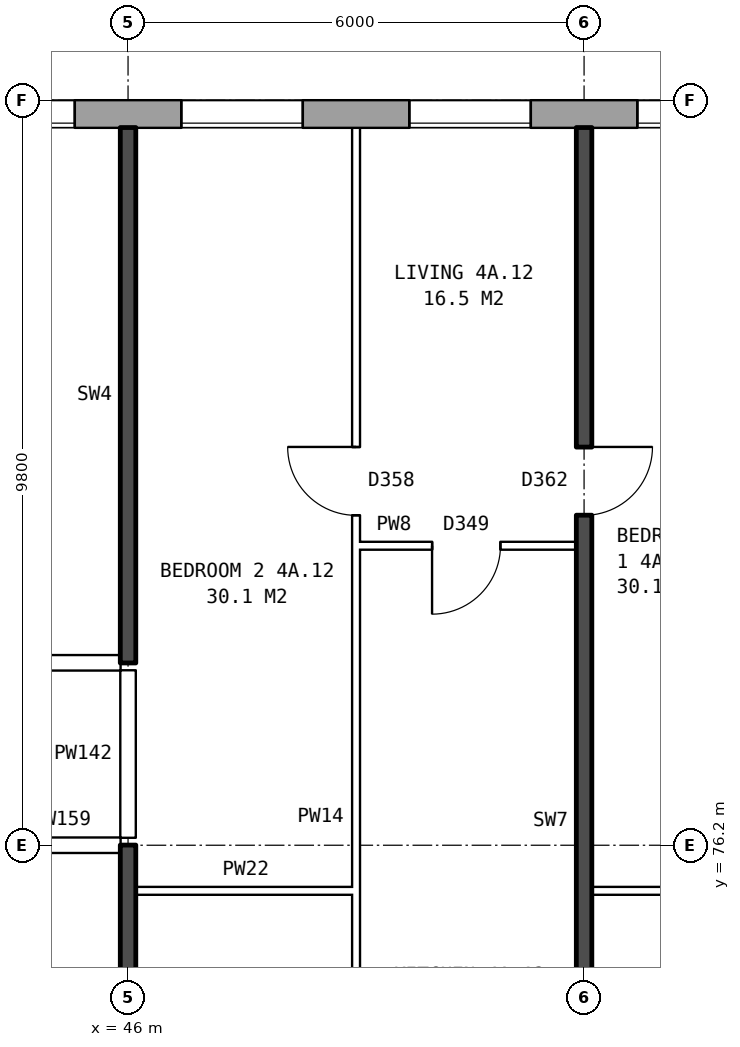
"""IFC4 building model, lengths in metres.
Left out: names, types, materials, properties, quantities, classifications, styles, units other than length and angle.
Written with IfcOpenShell. Run it as: python <this file> out.ifc"""

import sys

from ifc_helpers import new_model, si_unit, direction, frame, frame_2d, origin, place, context, subcontext, project, spatial, rectangle, extrude, element, fill, save


model = new_model("IFC4")
c1 = context("Model", 3, precision=1e-05, world=origin(), true_north=direction((0.0, 1.0)))
c2 = subcontext(c1, "Body", "Model", "MODEL_VIEW")
j1 = project(units=[si_unit("LENGTHUNIT", "METRE"), si_unit("PLANEANGLEUNIT", "RADIAN")], contexts=[c1])
p1 = place(None, origin())
s1 = spatial("IfcSite", under=j1, at=p1, CompositionType="ELEMENT")
p2 = place(p1, origin())
s2 = spatial("IfcBuilding", under=s1, at=p2, CompositionType="ELEMENT")
p3 = place(p2, frame((0.0, 0.0, 19.5)))
s3 = spatial("IfcBuildingStorey", under=s2, at=p3, CompositionType="ELEMENT", Elevation=19.5)
p4 = place(p3, frame((72.925, 85.82, 0.0), z_axis=(0.0, 0.0, 1.0), x_axis=(-1.0, 0.0, 0.0)))
e1 = element("IfcWall", 1, at=p4, inside=s3, PredefinedType="STANDARD", context=c2, shape_type="SweptSolid", body=[
    extrude(rectangle(XDim=50.101, YDim=0.36, at=frame_2d((25.05, 0.0))), origin(), (0.0, 0.0, 1.0), 2.85),
])
p5 = place(p4, frame((0.75, 0.0, 0.8)))
e2 = element("IfcOpeningElement", 2, at=p5, cuts=e1, PredefinedType="OPENING", context=c2, shape_type="SweptSolid", body=[
    extrude(rectangle(XDim=0.6, YDim=0.9, at=frame_2d((0.3, 0.45))), frame((0.0, 0.19, 0.0), z_axis=(0.0, -1.0, 0.0), x_axis=(1.0, 0.0, 0.0)), (0.0, 0.0, 1.0), 0.38),
])
p6 = place(p4, frame((3.625, 0.0, 0.8)))
e3 = element("IfcOpeningElement", 3, at=p6, cuts=e1, PredefinedType="OPENING", context=c2, shape_type="SweptSolid", body=[
    extrude(rectangle(XDim=1.6, YDim=1.8, at=frame_2d((0.8, 0.9))), frame((0.0, 0.19, 0.0), z_axis=(0.0, -1.0, 0.0), x_axis=(1.0, 0.0, 0.0)), (0.0, 0.0, 1.0), 0.38),
])
p7 = place(p4, frame((6.625, 0.0, 0.8)))
e4 = element("IfcOpeningElement", 4, at=p7, cuts=e1, PredefinedType="OPENING", context=c2, shape_type="SweptSolid", body=[
    extrude(rectangle(XDim=1.6, YDim=1.8, at=frame_2d((0.8, 0.9))), frame((0.0, 0.19, 0.0), z_axis=(0.0, -1.0, 0.0), x_axis=(1.0, 0.0, 0.0)), (0.0, 0.0, 1.0), 0.38),
])
p8 = place(p4, frame((9.625, 0.0, 0.8)))
e5 = element("IfcOpeningElement", 5, at=p8, cuts=e1, PredefinedType="OPENING", context=c2, shape_type="SweptSolid", body=[
    extrude(rectangle(XDim=1.6, YDim=1.8, at=frame_2d((0.8, 0.9))), frame((0.0, 0.19, 0.0), z_axis=(0.0, -1.0, 0.0), x_axis=(1.0, 0.0, 0.0)), (0.0, 0.0, 1.0), 0.38),
])
p9 = place(p4, frame((12.625, 0.0, 0.8)))
e6 = element("IfcOpeningElement", 6, at=p9, cuts=e1, PredefinedType="OPENING", context=c2, shape_type="SweptSolid", body=[
    extrude(rectangle(XDim=1.6, YDim=1.8, at=frame_2d((0.8, 0.9))), frame((0.0, 0.19, 0.0), z_axis=(0.0, -1.0, 0.0), x_axis=(1.0, 0.0, 0.0)), (0.0, 0.0, 1.0), 0.38),
])
p10 = place(p4, frame((15.625, 0.0, 0.8)))
e7 = element("IfcOpeningElement", 7, at=p10, cuts=e1, PredefinedType="OPENING", context=c2, shape_type="SweptSolid", body=[
    extrude(rectangle(XDim=1.6, YDim=1.8, at=frame_2d((0.8, 0.9))), frame((0.0, 0.19, 0.0), z_axis=(0.0, -1.0, 0.0), x_axis=(1.0, 0.0, 0.0)), (0.0, 0.0, 1.0), 0.38),
])
p11 = place(p4, frame((18.625, 0.0, 0.8)))
e8 = element("IfcOpeningElement", 8, at=p11, cuts=e1, PredefinedType="OPENING", context=c2, shape_type="SweptSolid", body=[
    extrude(rectangle(XDim=1.6, YDim=1.8, at=frame_2d((0.8, 0.9))), frame((0.0, 0.19, 0.0), z_axis=(0.0, -1.0, 0.0), x_axis=(1.0, 0.0, 0.0)), (0.0, 0.0, 1.0), 0.38),
])
p12 = place(p4, frame((21.625, 0.0, 0.8)))
e9 = element("IfcOpeningElement", 9, at=p12, cuts=e1, PredefinedType="OPENING", context=c2, shape_type="SweptSolid", body=[
    extrude(rectangle(XDim=1.6, YDim=1.8, at=frame_2d((0.8, 0.9))), frame((0.0, 0.19, 0.0), z_axis=(0.0, -1.0, 0.0), x_axis=(1.0, 0.0, 0.0)), (0.0, 0.0, 1.0), 0.38),
])
p13 = place(p4, frame((24.625, 0.0, 0.8)))
e10 = element("IfcOpeningElement", 10, at=p13, cuts=e1, PredefinedType="OPENING", context=c2, shape_type="SweptSolid", body=[
    extrude(rectangle(XDim=1.6, YDim=1.8, at=frame_2d((0.8, 0.9))), frame((0.0, 0.19, 0.0), z_axis=(0.0, -1.0, 0.0), x_axis=(1.0, 0.0, 0.0)), (0.0, 0.0, 1.0), 0.38),
])
p14 = place(p4, frame((27.625, 0.0, 0.8)))
e11 = element("IfcOpeningElement", 11, at=p14, cuts=e1, PredefinedType="OPENING", context=c2, shape_type="SweptSolid", body=[
    extrude(rectangle(XDim=1.6, YDim=1.8, at=frame_2d((0.8, 0.9))), frame((0.0, 0.19, 0.0), z_axis=(0.0, -1.0, 0.0), x_axis=(1.0, 0.0, 0.0)), (0.0, 0.0, 1.0), 0.38),
])
p15 = place(p4, frame((30.625, 0.0, 0.8)))
e12 = element("IfcOpeningElement", 12, at=p15, cuts=e1, PredefinedType="OPENING", context=c2, shape_type="SweptSolid", body=[
    extrude(rectangle(XDim=1.6, YDim=1.8, at=frame_2d((0.8, 0.9))), frame((0.0, 0.19, 0.0), z_axis=(0.0, -1.0, 0.0), x_axis=(1.0, 0.0, 0.0)), (0.0, 0.0, 1.0), 0.38),
])
p16 = place(p4, frame((33.625, 0.0, 0.8)))
e13 = element("IfcOpeningElement", 13, at=p16, cuts=e1, PredefinedType="OPENING", context=c2, shape_type="SweptSolid", body=[
    extrude(rectangle(XDim=1.6, YDim=1.8, at=frame_2d((0.8, 0.9))), frame((0.0, 0.19, 0.0), z_axis=(0.0, -1.0, 0.0), x_axis=(1.0, 0.0, 0.0)), (0.0, 0.0, 1.0), 0.38),
])
p17 = place(p4, frame((36.625, 0.0, 0.8)))
e14 = element("IfcOpeningElement", 14, at=p17, cuts=e1, PredefinedType="OPENING", context=c2, shape_type="SweptSolid", body=[
    extrude(rectangle(XDim=1.6, YDim=1.8, at=frame_2d((0.8, 0.9))), frame((0.0, 0.19, 0.0), z_axis=(0.0, -1.0, 0.0), x_axis=(1.0, 0.0, 0.0)), (0.0, 0.0, 1.0), 0.38),
])
p18 = place(p4, frame((39.625, 0.0, 0.8)))
e15 = element("IfcOpeningElement", 15, at=p18, cuts=e1, PredefinedType="OPENING", context=c2, shape_type="SweptSolid", body=[
    extrude(rectangle(XDim=1.6, YDim=1.8, at=frame_2d((0.8, 0.9))), frame((0.0, 0.19, 0.0), z_axis=(0.0, -1.0, 0.0), x_axis=(1.0, 0.0, 0.0)), (0.0, 0.0, 1.0), 0.38),
])
p19 = place(p4, frame((42.625, 0.0, 0.8)))
e16 = element("IfcOpeningElement", 16, at=p19, cuts=e1, PredefinedType="OPENING", context=c2, shape_type="SweptSolid", body=[
    extrude(rectangle(XDim=1.6, YDim=1.8, at=frame_2d((0.8, 0.9))), frame((0.0, 0.19, 0.0), z_axis=(0.0, -1.0, 0.0), x_axis=(1.0, 0.0, 0.0)), (0.0, 0.0, 1.0), 0.38),
])
p20 = place(p4, frame((45.625, 0.0, 0.8)))
e17 = element("IfcOpeningElement", 17, at=p20, cuts=e1, PredefinedType="OPENING", context=c2, shape_type="SweptSolid", body=[
    extrude(rectangle(XDim=1.6, YDim=1.8, at=frame_2d((0.8, 0.9))), frame((0.0, 0.19, 0.0), z_axis=(0.0, -1.0, 0.0), x_axis=(1.0, 0.0, 0.0)), (0.0, 0.0, 1.0), 0.38),
])
p21 = place(p4, frame((1.65, 0.0, 0.8)))
e18 = element("IfcOpeningElement", 18, at=p21, cuts=e1, PredefinedType="OPENING", context=c2, shape_type="SweptSolid", body=[
    extrude(rectangle(XDim=1.0, YDim=1.5, at=frame_2d((0.5, 0.75))), frame((0.0, 0.19, 0.0), z_axis=(0.0, -1.0, 0.0), x_axis=(1.0, 0.0, 0.0)), (0.0, 0.0, 1.0), 0.38),
])
p22 = place(p3, frame((46.1, 75.6, 0.0), z_axis=(0.0, 0.0, 1.0), x_axis=(1.0, 0.0, 0.0)))
e19 = element("IfcWall", 19, at=p22, inside=s3, PredefinedType="PARTITIONING", context=c2, shape_type="SweptSolid", body=[
    extrude(rectangle(XDim=2.9, YDim=0.1, at=frame_2d((1.45, 0.0))), origin(), (0.0, 0.0, 1.0), 2.85),
])
p23 = place(p3, frame((52.1, 75.6, 0.0), z_axis=(0.0, 0.0, 1.0), x_axis=(1.0, 0.0, 0.0)))
e20 = element("IfcWall", 20, at=p23, inside=s3, PredefinedType="PARTITIONING", context=c2, shape_type="SweptSolid", body=[
    extrude(rectangle(XDim=2.8, YDim=0.1, at=frame_2d((1.4, 0.0))), origin(), (0.0, 0.0, 1.0), 2.85),
])
p24 = place(p3, frame((44.36, 76.2, 0.0), z_axis=(0.0, 0.0, 1.0), x_axis=(1.0, 0.0, 0.0)))
e21 = element("IfcWall", 21, at=p24, inside=s3, PredefinedType="PARTITIONING", context=c2, shape_type="SweptSolid", body=[
    extrude(rectangle(XDim=1.54, YDim=0.2, at=frame_2d((0.77, 0.0))), origin(), (0.0, 0.0, 1.0), 2.85),
])
p25 = place(p3, frame((20.11, 78.6, 0.0), z_axis=(0.0, 0.0, 1.0), x_axis=(1.0, 0.0, 0.0)))
e22 = element("IfcWall", 22, at=p25, inside=s3, PredefinedType="PARTITIONING", context=c2, shape_type="SweptSolid", body=[
    extrude(rectangle(XDim=25.79, YDim=0.2, at=frame_2d((12.895, 0.0))), origin(), (0.0, 0.0, 1.0), 2.85),
])
p26 = place(p25, frame((22.34, 0.0, 0.0)))
e23 = element("IfcOpeningElement", 23, at=p26, cuts=e22, PredefinedType="OPENING", context=c2, shape_type="SweptSolid", body=[
    extrude(rectangle(XDim=1.0, YDim=2.1, at=frame_2d((0.5, 1.05))), frame((0.0, 0.11, 0.0), z_axis=(0.0, -1.0, 0.0), x_axis=(1.0, 0.0, 0.0)), (0.0, 0.0, 1.0), 0.22),
])
p27 = place(p25, frame((10.39, 0.0, 0.0)))
e24 = element("IfcOpeningElement", 24, at=p27, cuts=e22, PredefinedType="OPENING", context=c2, shape_type="SweptSolid", body=[
    extrude(rectangle(XDim=1.0, YDim=2.1, at=frame_2d((0.5, 1.05))), frame((0.0, 0.11, 0.0), z_axis=(0.0, -1.0, 0.0), x_axis=(1.0, 0.0, 0.0)), (0.0, 0.0, 1.0), 0.22),
])
p28 = place(p25, frame((2.245, 0.0, 0.0)))
e25 = element("IfcOpeningElement", 25, at=p28, cuts=e22, PredefinedType="OPENING", context=c2, shape_type="SweptSolid", body=[
    extrude(rectangle(XDim=1.0, YDim=2.1, at=frame_2d((0.5, 1.05))), frame((0.0, 0.11, 0.0), z_axis=(0.0, -1.0, 0.0), x_axis=(1.0, 0.0, 0.0)), (0.0, 0.0, 1.0), 0.22),
])
p29 = place(p3, frame((49.0, 80.14, 0.0), z_axis=(0.0, 0.0, 1.0), x_axis=(1.0, 0.0, 0.0)))
e26 = element("IfcWall", 26, at=p29, inside=s3, PredefinedType="PARTITIONING", context=c2, shape_type="SweptSolid", body=[
    extrude(rectangle(XDim=2.9, YDim=0.1, at=frame_2d((1.45, 0.0))), origin(), (0.0, 0.0, 1.0), 2.85),
])
p30 = place(p29, frame((1.0, 0.0, 0.0)))
e27 = element("IfcOpeningElement", 27, at=p30, cuts=e26, PredefinedType="OPENING", context=c2, shape_type="SweptSolid", body=[
    extrude(rectangle(XDim=0.9, YDim=2.1, at=frame_2d((0.45, 1.05))), frame((0.0, 0.06, 0.0), z_axis=(0.0, -1.0, 0.0), x_axis=(1.0, 0.0, 0.0)), (0.0, 0.0, 1.0), 0.12),
])
p31 = place(p3, frame((46.0, 71.2, 0.0), z_axis=(0.0, 0.0, 1.0), x_axis=(0.0, 1.0, 0.0)))
e28 = element("IfcWall", 28, at=p31, inside=s3, PredefinedType="SOLIDWALL", context=c2, shape_type="SweptSolid", body=[
    extrude(rectangle(XDim=5.0, YDim=0.2, at=frame_2d((2.5, 0.0))), origin(), (0.0, 0.0, 1.0), 2.85),
])
p32 = place(p3, frame((46.0, 76.3, 0.0), z_axis=(0.0, 0.0, 1.0), x_axis=(0.0, 1.0, 0.0)))
e29 = element("IfcWall", 29, at=p32, inside=s3, PredefinedType="PARTITIONING", context=c2, shape_type="SweptSolid", body=[
    extrude(rectangle(XDim=2.2, YDim=0.2, at=frame_2d((1.1, 0.0))), origin(), (0.0, 0.0, 1.0), 2.85),
])
p33 = place(p3, frame((46.0, 78.6, 0.0), z_axis=(0.0, 0.0, 1.0), x_axis=(0.0, 1.0, 0.0)))
e30 = element("IfcWall", 30, at=p33, inside=s3, PredefinedType="SOLIDWALL", context=c2, shape_type="SweptSolid", body=[
    extrude(rectangle(XDim=7.04, YDim=0.2, at=frame_2d((3.52, 0.0))), origin(), (0.0, 0.0, 1.0), 2.85),
])
p34 = place(p3, frame((49.0, 71.3, 0.0), z_axis=(0.0, 0.0, 1.0), x_axis=(0.0, 1.0, 0.0)))
e31 = element("IfcWall", 31, at=p34, inside=s3, PredefinedType="PARTITIONING", context=c2, shape_type="SweptSolid", body=[
    extrude(rectangle(XDim=14.34, YDim=0.1, at=frame_2d((7.17, 0.0))), origin(), (0.0, 0.0, 1.0), 2.85),
])
p35 = place(p34, frame((9.24, 0.0, 0.0)))
e32 = element("IfcOpeningElement", 32, at=p35, cuts=e31, PredefinedType="OPENING", context=c2, shape_type="SweptSolid", body=[
    extrude(rectangle(XDim=0.9, YDim=2.1, at=frame_2d((0.45, 1.05))), frame((0.0, 0.06, 0.0), z_axis=(0.0, -1.0, 0.0), x_axis=(1.0, 0.0, 0.0)), (0.0, 0.0, 1.0), 0.12),
])
p36 = place(p34, frame((0.4, 0.0, 0.0)))
e33 = element("IfcOpeningElement", 33, at=p36, cuts=e31, PredefinedType="OPENING", context=c2, shape_type="SweptSolid", body=[
    extrude(rectangle(XDim=0.9, YDim=2.1, at=frame_2d((0.45, 1.05))), frame((0.0, 0.06, 0.0), z_axis=(0.0, -1.0, 0.0), x_axis=(1.0, 0.0, 0.0)), (0.0, 0.0, 1.0), 0.12),
])
p37 = place(p3, frame((52.0, 71.2, 0.0), z_axis=(0.0, 0.0, 1.0), x_axis=(0.0, 1.0, 0.0)))
e34 = element("IfcWall", 34, at=p37, inside=s3, PredefinedType="SOLIDWALL", context=c2, shape_type="SweptSolid", body=[
    extrude(rectangle(XDim=14.44, YDim=0.2, at=frame_2d((7.22, 0.0))), origin(), (0.0, 0.0, 1.0), 2.85),
])
p38 = place(p37, frame((9.34, 0.0, 0.0)))
e35 = element("IfcOpeningElement", 35, at=p38, cuts=e34, PredefinedType="OPENING", context=c2, shape_type="SweptSolid", body=[
    extrude(rectangle(XDim=0.9, YDim=2.1, at=frame_2d((0.45, 1.05))), frame((0.0, 0.11, 0.0), z_axis=(0.0, -1.0, 0.0), x_axis=(1.0, 0.0, 0.0)), (0.0, 0.0, 1.0), 0.22),
])
p39 = place(p37, frame((0.4, 0.0, 0.0)))
e36 = element("IfcOpeningElement", 36, at=p39, cuts=e34, PredefinedType="OPENING", context=c2, shape_type="SweptSolid", body=[
    extrude(rectangle(XDim=0.9, YDim=2.1, at=frame_2d((0.45, 1.05))), frame((0.0, 0.11, 0.0), z_axis=(0.0, -1.0, 0.0), x_axis=(1.0, 0.0, 0.0)), (0.0, 0.0, 1.0), 0.22),
])
p40 = place(p11, origin())
e37 = element("IfcWindow", 37, at=p40, inside=s3, PartitioningType="SINGLE_PANEL", PredefinedType="WINDOW", context=c2, shape_type="SweptSolid", body=[
    extrude(rectangle(XDim=1.6, YDim=1.8, at=frame_2d((0.8, 0.9))), frame((0.0, 0.15, 0.0), z_axis=(0.0, -1.0, 0.0), x_axis=(1.0, 0.0, 0.0)), (0.0, 0.0, 1.0), 0.06),
])
fill(e8, e37)
p41 = place(p12, origin())
e38 = element("IfcWindow", 38, at=p41, inside=s3, PartitioningType="SINGLE_PANEL", PredefinedType="WINDOW", context=c2, shape_type="SweptSolid", body=[
    extrude(rectangle(XDim=1.6, YDim=1.8, at=frame_2d((0.8, 0.9))), frame((0.0, 0.15, 0.0), z_axis=(0.0, -1.0, 0.0), x_axis=(1.0, 0.0, 0.0)), (0.0, 0.0, 1.0), 0.06),
])
fill(e9, e38)
p42 = place(p13, origin())
e39 = element("IfcWindow", 39, at=p42, inside=s3, PartitioningType="SINGLE_PANEL", PredefinedType="WINDOW", context=c2, shape_type="SweptSolid", body=[
    extrude(rectangle(XDim=1.6, YDim=1.8, at=frame_2d((0.8, 0.9))), frame((0.0, 0.15, 0.0), z_axis=(0.0, -1.0, 0.0), x_axis=(1.0, 0.0, 0.0)), (0.0, 0.0, 1.0), 0.06),
])
fill(e10, e39)
p43 = place(p14, origin())
e40 = element("IfcWindow", 40, at=p43, inside=s3, PartitioningType="SINGLE_PANEL", PredefinedType="WINDOW", context=c2, shape_type="SweptSolid", body=[
    extrude(rectangle(XDim=1.6, YDim=1.8, at=frame_2d((0.8, 0.9))), frame((0.0, 0.15, 0.0), z_axis=(0.0, -1.0, 0.0), x_axis=(1.0, 0.0, 0.0)), (0.0, 0.0, 1.0), 0.06),
])
fill(e11, e40)
p44 = place(p38, frame((0.9, 0.0, 0.0), z_axis=(0.0, 0.0, 1.0), x_axis=(-1.0, 0.0, 0.0)))
e41 = element("IfcDoor", 41, at=p44, inside=s3, OperationType="SINGLE_SWING_LEFT", PredefinedType="DOOR", context=c2, shape_type="SweptSolid", body=[
    extrude(rectangle(XDim=0.9, YDim=2.1, at=frame_2d((0.45, 1.05))), frame((0.0, 0.025, 0.0), z_axis=(0.0, -1.0, 0.0), x_axis=(1.0, 0.0, 0.0)), (0.0, 0.0, 1.0), 0.05),
])
fill(e35, e41)
p45 = place(p35, origin())
e42 = element("IfcDoor", 42, at=p45, inside=s3, OperationType="SINGLE_SWING_RIGHT", PredefinedType="DOOR", context=c2, shape_type="SweptSolid", body=[
    extrude(rectangle(XDim=0.9, YDim=2.1, at=frame_2d((0.45, 1.05))), frame((0.0, 0.025, 0.0), z_axis=(0.0, -1.0, 0.0), x_axis=(1.0, 0.0, 0.0)), (0.0, 0.0, 1.0), 0.05),
])
fill(e32, e42)
p46 = place(p30, frame((0.9, 0.0, 0.0), z_axis=(0.0, 0.0, 1.0), x_axis=(-1.0, 0.0, 0.0)))
e43 = element("IfcDoor", 43, at=p46, inside=s3, OperationType="SINGLE_SWING_RIGHT", PredefinedType="DOOR", context=c2, shape_type="SweptSolid", body=[
    extrude(rectangle(XDim=0.9, YDim=2.1, at=frame_2d((0.45, 1.05))), frame((0.0, 0.025, 0.0), z_axis=(0.0, -1.0, 0.0), x_axis=(1.0, 0.0, 0.0)), (0.0, 0.0, 1.0), 0.05),
])
fill(e27, e43)
save(model, sys.argv[1])
